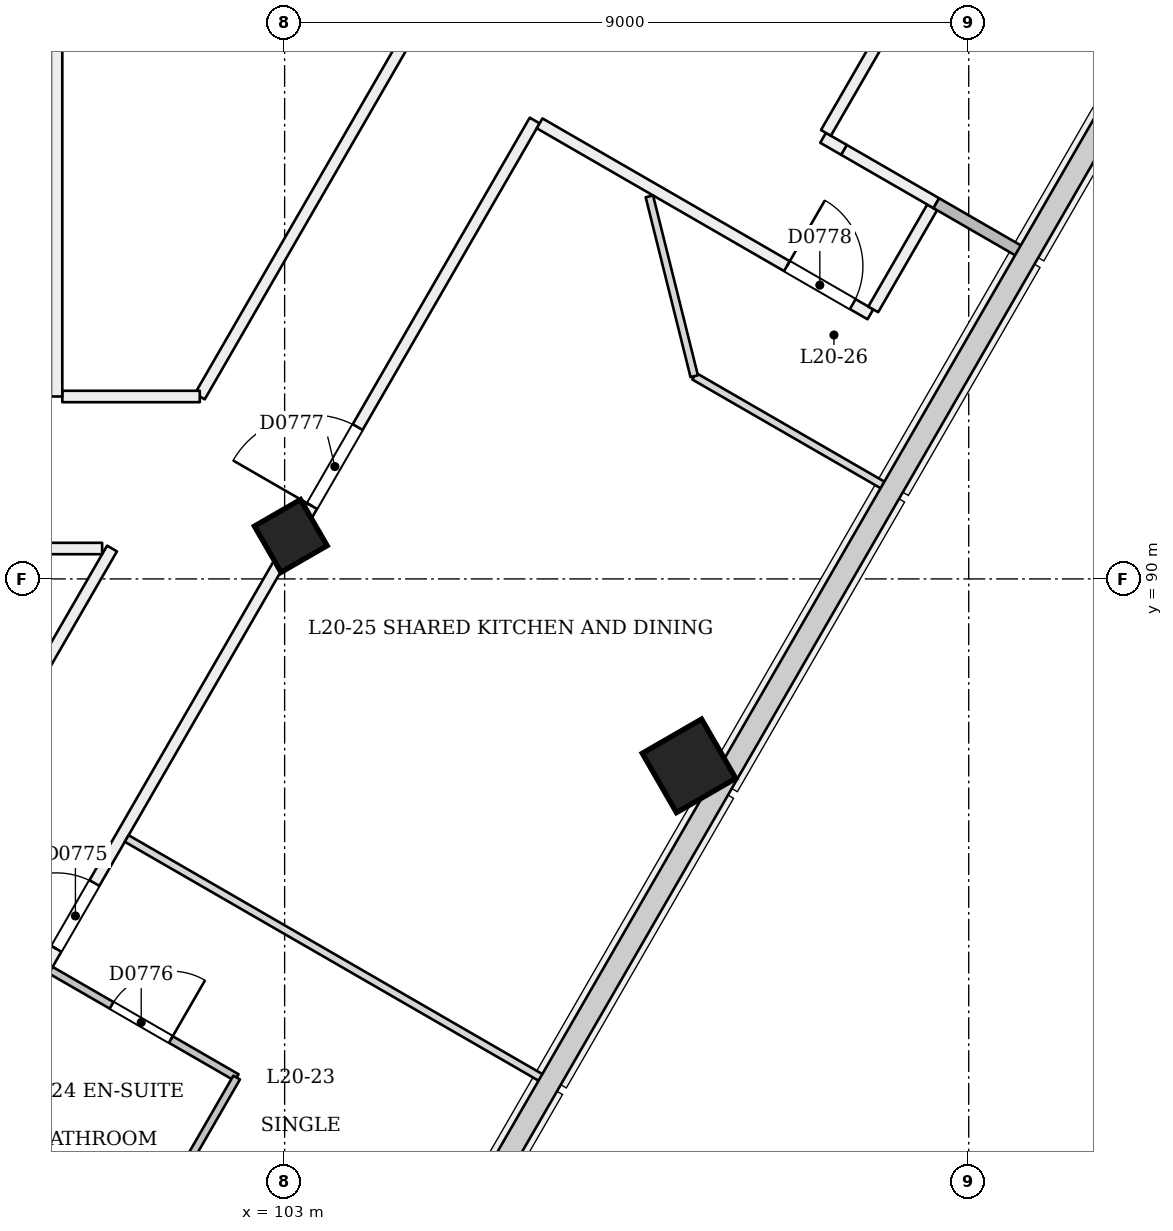
"""IFC4 building model, lengths in metres.
Left out: names, types, materials, properties, quantities, classifications, styles, units other than length and angle.
Written with IfcOpenShell. Run it as: python <this file> out.ifc"""

import sys

from ifc_helpers import new_model, si_unit, direction, frame, frame_2d, origin, origin_2d, place, context, subcontext, project, spatial, rectangle, extrude, element, fill, save


model = new_model("IFC4")
c1 = context("Model", 3, precision=1e-05, world=origin(), true_north=direction((0.0, 1.0)))
c2 = subcontext(c1, "Body", "Model", "MODEL_VIEW")
j1 = project(units=[si_unit("LENGTHUNIT", "METRE"), si_unit("PLANEANGLEUNIT", "RADIAN")], contexts=[c1])
p1 = place(None, origin())
s1 = spatial("IfcSite", under=j1, at=p1, CompositionType="ELEMENT")
p2 = place(p1, origin())
s2 = spatial("IfcBuilding", under=s1, at=p2, CompositionType="ELEMENT")
p3 = place(p2, frame((0.0, 0.0, 81.0)))
s3 = spatial("IfcBuildingStorey", under=s2, at=p3, CompositionType="ELEMENT", Elevation=81.0)
p4 = place(p3, frame((103.108, 90.519, -0.021), z_axis=(-0.02215369191, 0.038413282303, 0.999016333038), x_axis=(-0.500657426602, -0.865361516108, 0.022171775474)))
e1 = element("IfcColumn", 1, at=p4, inside=s3, PredefinedType="COLUMN", context=c2, shape_type="SweptSolid", body=[
    extrude(rectangle(XDim=0.7, YDim=0.7, at=origin_2d()), origin(), (0.0, 0.0, 1.0), 3.604),
])
p5 = place(p3, frame((108.348, 87.493, -0.027), z_axis=(-0.02222134892, 0.038480872521, 0.999012229206), x_axis=(-0.500174608052, -0.865639488445, 0.022217954564)))
e2 = element("IfcColumn", 2, at=p5, inside=s3, PredefinedType="COLUMN", context=c2, shape_type="SweptSolid", body=[
    extrude(rectangle(XDim=0.9, YDim=0.9, at=origin_2d()), origin(), (0.0, 0.0, 1.0), 3.604),
])
p6 = place(p3, frame((85.67, 60.317, 0.0), z_axis=(0.0, 0.0, 1.0), x_axis=(0.499998839017, 0.866026074077, 0.0)))
e3 = element("IfcWall", 3, at=p6, inside=s3, PredefinedType="PARTITIONING", context=c2, shape_type="SweptSolid", body=[
    extrude(rectangle(XDim=41.239, YDim=0.15, at=frame_2d((20.62, 0.0))), origin(), (0.0, 0.0, 1.0), 2.7),
])
p7 = place(p6, frame((3.246, 0.0, 0.0)))
e4 = element("IfcOpeningElement", 4, at=p7, cuts=e3, PredefinedType="OPENING", context=c2, shape_type="SweptSolid", body=[
    extrude(rectangle(XDim=1.2, YDim=2.1, at=frame_2d((0.6, 1.05))), frame((0.0, 0.085, 0.0), z_axis=(0.0, -1.0, 0.0), x_axis=(1.0, 0.0, 0.0)), (0.0, 0.0, 1.0), 0.171),
])
p8 = place(p6, frame((10.771, 0.0, 0.0)))
e5 = element("IfcOpeningElement", 5, at=p8, cuts=e3, PredefinedType="OPENING", context=c2, shape_type="SweptSolid", body=[
    extrude(rectangle(XDim=1.0, YDim=2.1, at=frame_2d((0.5, 1.05))), frame((0.0, 0.085, 0.0), z_axis=(0.0, -1.0, 0.0), x_axis=(1.0, 0.0, 0.0)), (0.0, 0.0, 1.0), 0.171),
])
p9 = place(p6, frame((14.125, 0.0, 0.0)))
e6 = element("IfcOpeningElement", 6, at=p9, cuts=e3, PredefinedType="OPENING", context=c2, shape_type="SweptSolid", body=[
    extrude(rectangle(XDim=1.0, YDim=2.1, at=frame_2d((0.5, 1.05))), frame((0.0, 0.085, 0.0), z_axis=(0.0, -1.0, 0.0), x_axis=(1.0, 0.0, 0.0)), (0.0, 0.0, 1.0), 0.171),
])
p10 = place(p6, frame((19.771, 0.0, 0.0)))
e7 = element("IfcOpeningElement", 7, at=p10, cuts=e3, PredefinedType="OPENING", context=c2, shape_type="SweptSolid", body=[
    extrude(rectangle(XDim=1.0, YDim=2.1, at=frame_2d((0.5, 1.05))), frame((0.0, 0.085, 0.0), z_axis=(0.0, -1.0, 0.0), x_axis=(1.0, 0.0, 0.0)), (0.0, 0.0, 1.0), 0.171),
])
p11 = place(p6, frame((21.98, 0.0, 0.0)))
e8 = element("IfcOpeningElement", 8, at=p11, cuts=e3, PredefinedType="OPENING", context=c2, shape_type="SweptSolid", body=[
    extrude(rectangle(XDim=1.0, YDim=2.1, at=frame_2d((0.5, 1.05))), frame((0.0, 0.085, 0.0), z_axis=(0.0, -1.0, 0.0), x_axis=(1.0, 0.0, 0.0)), (0.0, 0.0, 1.0), 0.171),
])
p12 = place(p6, frame((28.655, 0.0, 0.0)))
e9 = element("IfcOpeningElement", 9, at=p12, cuts=e3, PredefinedType="OPENING", context=c2, shape_type="SweptSolid", body=[
    extrude(rectangle(XDim=1.0, YDim=2.1, at=frame_2d((0.5, 1.05))), frame((0.0, 0.085, 0.0), z_axis=(0.0, -1.0, 0.0), x_axis=(1.0, 0.0, 0.0)), (0.0, 0.0, 1.0), 0.171),
])
p13 = place(p6, frame((35.382, 0.0, 0.0)))
e10 = element("IfcOpeningElement", 10, at=p13, cuts=e3, PredefinedType="OPENING", context=c2, shape_type="SweptSolid", body=[
    extrude(rectangle(XDim=1.2, YDim=2.1, at=frame_2d((0.6, 1.05))), frame((0.0, 0.085, 0.0), z_axis=(0.0, -1.0, 0.0), x_axis=(1.0, 0.0, 0.0)), (0.0, 0.0, 1.0), 0.171),
])
p14 = place(p3, frame((106.354, 95.993, 0.0), z_axis=(0.0, 0.0, 1.0), x_axis=(0.86603105345, -0.499990214365, 0.0)))
e11 = element("IfcWall", 11, at=p14, inside=s3, PredefinedType="PARTITIONING", context=c2, shape_type="SweptSolid", body=[
    extrude(rectangle(XDim=5.025, YDim=0.15, at=frame_2d((2.512, 0.0))), origin(), (0.0, 0.0, 1.0), 2.6),
])
p15 = place(p14, frame((3.757, 0.0, 0.0)))
e12 = element("IfcOpeningElement", 12, at=p15, cuts=e11, PredefinedType="OPENING", context=c2, shape_type="SweptSolid", body=[
    extrude(rectangle(XDim=1.0, YDim=2.1, at=frame_2d((0.5, 1.05))), frame((0.0, 0.085, 0.0), z_axis=(0.0, -1.0, 0.0), x_axis=(1.0, 0.0, 0.0)), (0.0, 0.0, 1.0), 0.171),
])
p16 = place(p3, frame((110.744, 93.546, 0.0), z_axis=(0.0, 0.0, 1.0), x_axis=(0.500086022567, 0.865975732936, 0.0)))
e13 = element("IfcWall", 13, at=p16, inside=s3, PredefinedType="PARTITIONING", context=c2, shape_type="SweptSolid", body=[
    extrude(rectangle(XDim=1.55, YDim=0.15, at=frame_2d((0.775, 0.0))), origin(), (0.0, 0.0, 1.0), 3.1),
])
p17 = place(p3, frame((100.729, 90.4, 0.0), z_axis=(0.0, 0.0, 1.0), x_axis=(-0.499997907204, -0.866026612058, 0.0)))
e14 = element("IfcWall", 14, at=p17, inside=s3, PredefinedType="PARTITIONING", context=c2, shape_type="SweptSolid", body=[
    extrude(rectangle(XDim=31.328, YDim=0.15, at=frame_2d((15.664, 0.0))), origin(), (0.0, 0.0, 1.0), 3.1),
])
p18 = place(p17, frame((11.681, 0.0, 0.0)))
e15 = element("IfcOpeningElement", 15, at=p18, cuts=e14, PredefinedType="OPENING", context=c2, shape_type="SweptSolid", body=[
    extrude(rectangle(XDim=1.2, YDim=2.1, at=frame_2d((0.6, 1.05))), frame((0.0, 0.085, 0.0), z_axis=(0.0, -1.0, 0.0), x_axis=(1.0, 0.0, 0.0)), (0.0, 0.0, 1.0), 0.171),
])
p19 = place(p3, frame((111.573, 94.943, 0.0), z_axis=(0.0, 0.0, 1.0), x_axis=(-0.865985641702, 0.500068863623, 0.0)))
e16 = element("IfcWall", 16, at=p19, inside=s3, PredefinedType="PARTITIONING", context=c2, shape_type="SweptSolid", body=[
    extrude(rectangle(XDim=1.403, YDim=0.15, at=frame_2d((0.702, 0.0))), origin(), (0.0, 0.0, 1.0), 3.1),
])
p20 = place(p3, frame((110.358, 95.645, 0.0), z_axis=(0.0, 0.0, 1.0), x_axis=(-0.8660059538, 0.500033686847, 0.0)))
e17 = element("IfcWall", 17, at=p20, inside=s3, PredefinedType="PARTITIONING", context=c2, shape_type="SweptSolid", body=[
    extrude(rectangle(XDim=0.317, YDim=0.15, at=frame_2d((0.158, 0.0))), origin(), (0.0, 0.0, 1.0), 2.6),
])
p21 = place(p3, frame((110.122, 95.868, 0.0), z_axis=(0.0, 0.0, 1.0), x_axis=(0.499967891604, 0.866043940782, 0.0)))
e18 = element("IfcWall", 18, at=p21, inside=s3, PredefinedType="PARTITIONING", context=c2, shape_type="SweptSolid", body=[
    extrude(rectangle(XDim=1.55, YDim=0.15, at=frame_2d((0.775, 0.0))), origin(), (0.0, 0.0, 1.0), 2.6),
])
p22 = place(p3, frame((104.736, 97.34, 0.0), z_axis=(0.0, 0.0, 1.0), x_axis=(-0.499983049987, -0.866035189658, 0.0)))
e19 = element("IfcWall", 19, at=p22, inside=s3, PredefinedType="PARTITIONING", context=c2, shape_type="SweptSolid", body=[
    extrude(rectangle(XDim=5.704, YDim=0.15, at=frame_2d((2.852, 0.0))), origin(), (0.0, 0.0, 1.0), 3.1),
])
p23 = place(p3, frame((101.884, 92.4, 0.0), z_axis=(0.0, 0.0, 1.0), x_axis=(-1.0, 0.0, 0.0)))
e20 = element("IfcWall", 20, at=p23, inside=s3, PredefinedType="PARTITIONING", context=c2, shape_type="SweptSolid", body=[
    extrude(rectangle(XDim=1.809, YDim=0.15, at=frame_2d((0.904, 0.0))), origin(), (0.0, 0.0, 1.0), 3.1),
])
p24 = place(p3, frame((100.0, 92.4, 0.0), z_axis=(0.0, 0.0, 1.0), x_axis=(0.0, 1.0, 0.0)))
e21 = element("IfcWall", 21, at=p24, inside=s3, PredefinedType="PARTITIONING", context=c2, shape_type="SweptSolid", body=[
    extrude(rectangle(XDim=11.5, YDim=0.15, at=frame_2d((5.75, 0.0))), origin(), (0.0, 0.0, 1.0), 2.6),
])
p25 = place(p24, frame((7.059, 0.0, 0.0)))
e22 = element("IfcOpeningElement", 22, at=p25, cuts=e21, PredefinedType="OPENING", context=c2, shape_type="SweptSolid", body=[
    extrude(rectangle(XDim=1.2, YDim=2.1, at=frame_2d((0.6, 1.05))), frame((0.0, 0.085, 0.0), z_axis=(0.0, -1.0, 0.0), x_axis=(1.0, 0.0, 0.0)), (0.0, 0.0, 1.0), 0.171),
])
p26 = place(p3, frame((88.0, 90.4, 0.0), z_axis=(0.0, 0.0, 1.0), x_axis=(1.0, 0.0, 0.0)))
e23 = element("IfcWall", 23, at=p26, inside=s3, PredefinedType="PARTITIONING", context=c2, shape_type="SweptSolid", body=[
    extrude(rectangle(XDim=12.599, YDim=0.15, at=frame_2d((6.3, 0.0))), origin(), (0.0, 0.0, 1.0), 3.1),
])
p27 = place(p26, frame((1.833, 0.0, 0.0)))
e24 = element("IfcOpeningElement", 24, at=p27, cuts=e23, PredefinedType="OPENING", context=c2, shape_type="SweptSolid", body=[
    extrude(rectangle(XDim=1.2, YDim=2.1, at=frame_2d((0.6, 1.05))), frame((0.0, 0.085, 0.0), z_axis=(0.0, -1.0, 0.0), x_axis=(1.0, 0.0, 0.0)), (0.0, 0.0, 1.0), 0.171),
])
p28 = place(p3, frame((101.119, 81.275, 0.0), z_axis=(0.0, 0.0, 1.0), x_axis=(-0.866048868473, 0.499959355765, 0.0)))
e25 = element("IfcWall", 25, at=p28, inside=s3, PredefinedType="PARTITIONING", context=c2, shape_type="SweptSolid", body=[
    extrude(rectangle(XDim=2.825, YDim=0.1, at=frame_2d((1.413, 0.0))), origin(), (0.0, 0.0, 1.0), 2.7),
])
p29 = place(p3, frame((99.922, 84.853, 0.0), z_axis=(0.0, 0.0, 1.0), x_axis=(0.866048868473, -0.499959355765, 0.0)))
e26 = element("IfcWall", 26, at=p29, inside=s3, PredefinedType="PARTITIONING", context=c2, shape_type="SweptSolid", body=[
    extrude(rectangle(XDim=2.825, YDim=0.1, at=frame_2d((1.413, 0.0))), origin(), (0.0, 0.0, 1.0), 3.1),
])
p30 = place(p29, frame((0.925, 0.0, 0.0)))
e27 = element("IfcOpeningElement", 27, at=p30, cuts=e26, PredefinedType="OPENING", context=c2, shape_type="SweptSolid", body=[
    extrude(rectangle(XDim=0.9, YDim=2.1, at=frame_2d((0.45, 1.05))), frame((0.0, 0.061, 0.0), z_axis=(0.0, -1.0, 0.0), x_axis=(1.0, 0.0, 0.0)), (0.0, 0.0, 1.0), 0.121),
])
p31 = place(p3, frame((102.369, 83.44, 0.0), z_axis=(0.0, 0.0, 1.0), x_axis=(-0.500004234368, -0.866022959057, 0.0)))
e28 = element("IfcWall", 28, at=p31, inside=s3, PredefinedType="PARTITIONING", context=c2, shape_type="SweptSolid", body=[
    extrude(rectangle(XDim=2.5, YDim=0.1, at=frame_2d((1.25, 0.0))), origin(), (0.0, 0.0, 1.0), 2.7),
])
p32 = place(p3, frame((106.417, 83.412, 0.0), z_axis=(0.0, 0.0, 1.0), x_axis=(-0.866025401434, 0.500000004071, 0.0)))
e29 = element("IfcWall", 29, at=p32, inside=s3, PredefinedType="PARTITIONING", context=c2, shape_type="SweptSolid", body=[
    extrude(rectangle(XDim=6.345, YDim=0.1, at=frame_2d((3.173, 0.0))), origin(), (0.0, 0.0, 1.0), 2.6),
])
p33 = place(p3, frame((110.917, 91.207, 0.0), z_axis=(0.0, 0.0, 1.0), x_axis=(-0.865996226145, 0.500050533749, 0.0)))
e30 = element("IfcWall", 30, at=p33, inside=s3, PredefinedType="PARTITIONING", context=c2, shape_type="SweptSolid", body=[
    extrude(rectangle(XDim=2.92, YDim=0.1, at=frame_2d((1.46, 0.0))), origin(), (0.0, 0.0, 1.0), 2.6),
])
p34 = place(p3, frame((108.389, 92.667, 0.0), z_axis=(0.0, 0.0, 1.0), x_axis=(-0.241970246572, 0.970283669745, 0.0)))
e31 = element("IfcWall", 31, at=p34, inside=s3, PredefinedType="PARTITIONING", context=c2, shape_type="SweptSolid", body=[
    extrude(rectangle(XDim=2.439, YDim=0.1, at=frame_2d((1.219, 0.0))), origin(), (0.0, 0.0, 1.0), 3.1),
])
p35 = place(p3, frame((112.699, 94.293, 0.0), z_axis=(0.0, 0.0, 1.0), x_axis=(-0.866004217611, 0.500036693733, 0.0)))
e32 = element("IfcWall", 32, at=p35, inside=s3, PredefinedType="PARTITIONING", context=c2, shape_type="SweptSolid", body=[
    extrude(rectangle(XDim=1.3, YDim=0.15, at=frame_2d((0.65, 0.0))), origin(), (0.0, 0.0, 1.0), 3.1),
])
p36 = place(p12, origin())
e33 = element("IfcDoor", 33, at=p36, inside=s3, OperationType="SINGLE_SWING_LEFT", PredefinedType="NOTDEFINED", context=c2, shape_type="SweptSolid", body=[
    extrude(rectangle(XDim=1.0, YDim=2.1, at=frame_2d((0.5, 1.05))), frame((0.0, 0.025, 0.0), z_axis=(0.0, -1.0, 0.0), x_axis=(1.0, 0.0, 0.0)), (0.0, 0.0, 1.0), 0.05),
])
fill(e9, e33)
p37 = place(p30, origin())
e34 = element("IfcDoor", 34, at=p37, inside=s3, OperationType="SINGLE_SWING_RIGHT", PredefinedType="NOTDEFINED", context=c2, shape_type="SweptSolid", body=[
    extrude(rectangle(XDim=0.9, YDim=2.1, at=frame_2d((0.45, 1.05))), frame((0.0, 0.025, 0.0), z_axis=(0.0, -1.0, 0.0), x_axis=(1.0, 0.0, 0.0)), (0.0, 0.0, 1.0), 0.05),
])
fill(e27, e34)
p38 = place(p13, origin())
e35 = element("IfcDoor", 35, at=p38, inside=s3, OperationType="SINGLE_SWING_LEFT", PredefinedType="NOTDEFINED", context=c2, shape_type="SweptSolid", body=[
    extrude(rectangle(XDim=1.2, YDim=2.1, at=frame_2d((0.6, 1.05))), frame((0.0, 0.025, 0.0), z_axis=(0.0, -1.0, 0.0), x_axis=(1.0, 0.0, 0.0)), (0.0, 0.0, 1.0), 0.05),
])
fill(e10, e35)
p39 = place(p15, origin())
e36 = element("IfcDoor", 36, at=p39, inside=s3, OperationType="SINGLE_SWING_LEFT", PredefinedType="NOTDEFINED", context=c2, shape_type="SweptSolid", body=[
    extrude(rectangle(XDim=1.0, YDim=2.1, at=frame_2d((0.5, 1.05))), frame((0.0, 0.025, 0.0), z_axis=(0.0, -1.0, 0.0), x_axis=(1.0, 0.0, 0.0)), (0.0, 0.0, 1.0), 0.05),
])
fill(e12, e36)
save(model, sys.argv[1])
